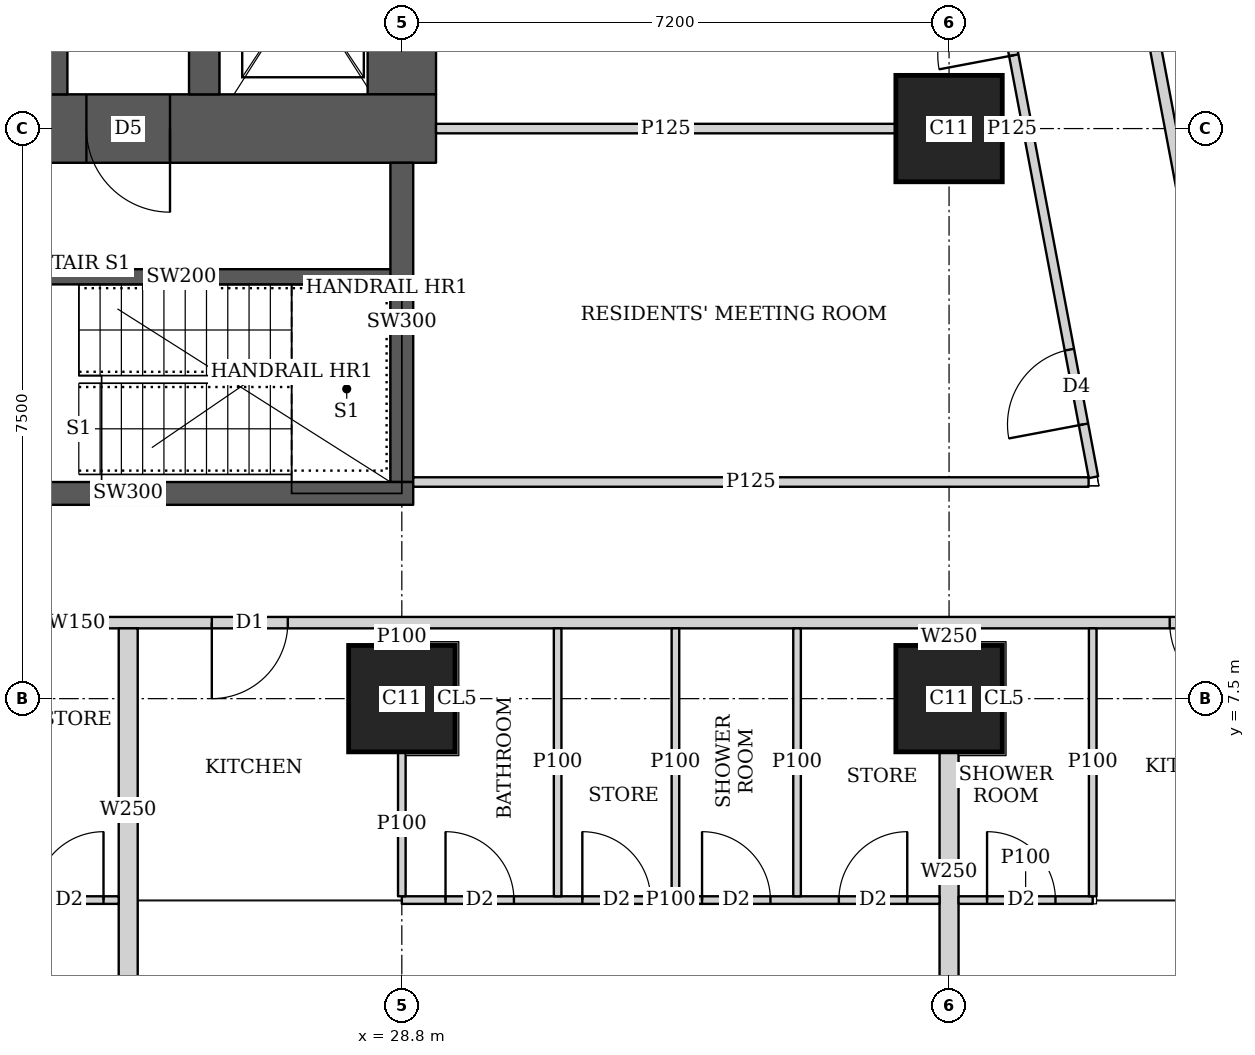
"""IFC4 building model, lengths in metres.
Left out: names, types, materials, properties, quantities, classifications, styles, units other than length and angle.
Written with IfcOpenShell. Run it as: python <this file> out.ifc"""

import sys

from ifc_helpers import new_model, si_unit, direction, frame, frame_2d, origin, origin_2d, place, context, subcontext, project, spatial, rectangle, extrude, element, fill, save


model = new_model("IFC4")
c1 = context("Model", 3, precision=1e-05, world=origin(), true_north=direction((0.0, 1.0)))
c2 = subcontext(c1, "Body", "Model", "MODEL_VIEW")
j1 = project(units=[si_unit("LENGTHUNIT", "METRE"), si_unit("PLANEANGLEUNIT", "RADIAN")], contexts=[c1])
p1 = place(None, origin())
s1 = spatial("IfcSite", under=j1, at=p1, CompositionType="ELEMENT")
p2 = place(p1, origin())
s2 = spatial("IfcBuilding", under=s1, at=p2, CompositionType="ELEMENT")
p3 = place(p2, frame((0.0, 0.0, 204.95)))
s3 = spatial("IfcBuildingStorey", under=s2, at=p3, CompositionType="ELEMENT", Elevation=204.95)
for number, where, z_axis, x_axis in (
    (1, (28.8, 7.5, 0.0), (0.0, 0.0, 1.0), (1.0, 0.0, 0.0)),
    (2, (36.0, 7.5, 0.0), (0.0, 0.0, 1.0), (1.0, 0.0, 0.0)),
    (3, (36.0, 15.0, 0.0), (0.0, 0.0, 1.0), (1.0, 0.0, 0.0)),
):
    element("IfcColumn", number, at=place(p3, frame(where, z_axis=z_axis, x_axis=x_axis)), inside=s3, PredefinedType="COLUMN", context=c2, shape_type="SweptSolid", body=[
        extrude(rectangle(XDim=1.4, YDim=1.4, at=origin_2d()), origin(), (0.0, 0.0, 1.0), 3.75),
    ])
p4 = place(p3, frame((13.95, 15.0, 0.0), z_axis=(0.0, 0.0, 1.0), x_axis=(1.0, 0.0, 0.0)))
e4 = element("IfcWall", 4, at=p4, inside=s3, PredefinedType="SHEAR", context=c2, shape_type="SweptSolid", body=[
    extrude(rectangle(XDim=15.3, YDim=0.9, at=frame_2d((7.65, 0.0))), origin(), (0.0, 0.0, 1.0), 3.75),
])
p5 = place(p4, frame((4.45, 0.0, 0.0)))
e5 = element("IfcOpeningElement", 5, at=p5, cuts=e4, PredefinedType="OPENING", context=c2, shape_type="SweptSolid", body=[
    extrude(rectangle(XDim=1.8, YDim=2.1, at=frame_2d((0.9, 1.05))), frame((0.0, 0.46, 0.0), z_axis=(0.0, -1.0, 0.0), x_axis=(1.0, 0.0, 0.0)), (0.0, 0.0, 1.0), 0.92),
])
p6 = place(p4, frame((10.7, 0.0, 0.0)))
e6 = element("IfcOpeningElement", 6, at=p6, cuts=e4, PredefinedType="OPENING", context=c2, shape_type="SweptSolid", body=[
    extrude(rectangle(XDim=1.1, YDim=2.1, at=frame_2d((0.55, 1.05))), frame((0.0, 0.46, 0.0), z_axis=(0.0, -1.0, 0.0), x_axis=(1.0, 0.0, 0.0)), (0.0, 0.0, 1.0), 0.92),
])
p7 = place(p3, frame((28.8, 15.45, 0.0), z_axis=(0.0, 0.0, 1.0), x_axis=(0.0, 1.0, 0.0)))
e7 = element("IfcWall", 7, at=p7, inside=s3, PredefinedType="SHEAR", context=c2, shape_type="SweptSolid", body=[
    extrude(rectangle(XDim=14.1, YDim=0.9, at=frame_2d((7.05, 0.0))), origin(), (0.0, 0.0, 1.0), 3.75),
])
p8 = place(p3, frame((24.2, 15.45, 0.0), z_axis=(0.0, 0.0, 1.0), x_axis=(0.0, 1.0, 0.0)))
e8 = element("IfcWall", 8, at=p8, inside=s3, PredefinedType="SHEAR", context=c2, shape_type="SweptSolid", body=[
    extrude(rectangle(XDim=14.1, YDim=0.4, at=frame_2d((7.05, 0.0))), origin(), (0.0, 0.0, 1.0), 3.75),
])
p9 = place(p3, frame((26.2, 15.45, 0.0), z_axis=(0.0, 0.0, 1.0), x_axis=(0.0, 1.0, 0.0)))
e9 = element("IfcWall", 9, at=p9, inside=s3, PredefinedType="SHEAR", context=c2, shape_type="SweptSolid", body=[
    extrude(rectangle(XDim=3.1, YDim=0.4, at=frame_2d((1.55, 0.0))), origin(), (0.0, 0.0, 1.0), 3.75),
])
p10 = place(p9, frame((0.825, 0.0, 0.0)))
e10 = element("IfcOpeningElement", 10, at=p10, cuts=e9, PredefinedType="OPENING", context=c2, shape_type="SweptSolid", body=[
    extrude(rectangle(XDim=1.2, YDim=2.1, at=frame_2d((0.6, 1.05))), frame((0.0, 0.21, 0.0), z_axis=(0.0, -1.0, 0.0), x_axis=(1.0, 0.0, 0.0)), (0.0, 0.0, 1.0), 0.42),
])
p11 = place(p3, frame((21.45, 10.2, 0.0), z_axis=(0.0, 0.0, 1.0), x_axis=(1.0, 0.0, 0.0)))
e11 = element("IfcWall", 11, at=p11, inside=s3, PredefinedType="SHEAR", context=c2, shape_type="SweptSolid", body=[
    extrude(rectangle(XDim=7.5, YDim=0.3, at=frame_2d((3.75, 0.0))), origin(), (0.0, 0.0, 1.0), 3.75),
])
p12 = place(p11, frame((0.5, 0.0, 0.0)))
e12 = element("IfcOpeningElement", 12, at=p12, cuts=e11, PredefinedType="OPENING", context=c2, shape_type="SweptSolid", body=[
    extrude(rectangle(XDim=1.1, YDim=2.1, at=frame_2d((0.55, 1.05))), frame((0.0, 0.16, 0.0), z_axis=(0.0, -1.0, 0.0), x_axis=(1.0, 0.0, 0.0)), (0.0, 0.0, 1.0), 0.32),
])
p13 = place(p3, frame((28.8, 10.35, 0.0), z_axis=(0.0, 0.0, 1.0), x_axis=(0.0, 1.0, 0.0)))
e13 = element("IfcWall", 13, at=p13, inside=s3, PredefinedType="SHEAR", context=c2, shape_type="SweptSolid", body=[
    extrude(rectangle(XDim=4.2, YDim=0.3, at=frame_2d((2.1, 0.0))), origin(), (0.0, 0.0, 1.0), 3.75),
])
p14 = place(p3, frame((40.053, 8.5, 0.0), z_axis=(0.0, 0.0, 1.0), x_axis=(-1.0, 0.0, 0.0)))
e14 = element("IfcWall", 14, at=p14, inside=s3, PredefinedType="SOLIDWALL", context=c2, shape_type="SweptSolid", body=[
    extrude(rectangle(XDim=31.052, YDim=0.15, at=frame_2d((15.526, 0.0))), origin(), (0.0, 0.0, 1.0), 3.5),
])
p15 = place(p14, frame((29.178, 0.0, 0.0)))
e15 = element("IfcOpeningElement", 15, at=p15, cuts=e14, PredefinedType="OPENING", context=c2, shape_type="SweptSolid", body=[
    extrude(rectangle(XDim=1.0, YDim=2.1, at=frame_2d((0.5, 1.05))), frame((0.0, 0.085, 0.0), z_axis=(0.0, -1.0, 0.0), x_axis=(1.0, 0.0, 0.0)), (0.0, 0.0, 1.0), 0.17),
])
p16 = place(p14, frame((19.953, 0.0, 0.0)))
e16 = element("IfcOpeningElement", 16, at=p16, cuts=e14, PredefinedType="OPENING", context=c2, shape_type="SweptSolid", body=[
    extrude(rectangle(XDim=1.0, YDim=2.1, at=frame_2d((0.5, 1.05))), frame((0.0, 0.085, 0.0), z_axis=(0.0, -1.0, 0.0), x_axis=(1.0, 0.0, 0.0)), (0.0, 0.0, 1.0), 0.17),
])
p17 = place(p14, frame((12.753, 0.0, 0.0)))
e17 = element("IfcOpeningElement", 17, at=p17, cuts=e14, PredefinedType="OPENING", context=c2, shape_type="SweptSolid", body=[
    extrude(rectangle(XDim=1.0, YDim=2.1, at=frame_2d((0.5, 1.05))), frame((0.0, 0.085, 0.0), z_axis=(0.0, -1.0, 0.0), x_axis=(1.0, 0.0, 0.0)), (0.0, 0.0, 1.0), 0.17),
])
p18 = place(p14, frame((0.15, 0.0, 0.0)))
e18 = element("IfcOpeningElement", 18, at=p18, cuts=e14, PredefinedType="OPENING", context=c2, shape_type="SweptSolid", body=[
    extrude(rectangle(XDim=1.0, YDim=2.1, at=frame_2d((0.5, 1.05))), frame((0.0, 0.085, 0.0), z_axis=(0.0, -1.0, 0.0), x_axis=(1.0, 0.0, 0.0)), (0.0, 0.0, 1.0), 0.17),
])
p19 = place(p3, frame((33.68, 42.723, 0.0), z_axis=(0.0, 0.0, 1.0), x_axis=(0.185601160014, -0.982625162207, 0.0)))
e19 = element("IfcWall", 19, at=p19, inside=s3, PredefinedType="SOLIDWALL", context=c2, shape_type="SweptSolid", body=[
    extrude(rectangle(XDim=41.051, YDim=0.15, at=frame_2d((20.526, 0.0))), origin(), (0.0, 0.0, 1.0), 2.5),
])
p20 = place(p19, frame((12.307, 0.0, 0.0)))
e20 = element("IfcOpeningElement", 20, at=p20, cuts=e19, PredefinedType="OPENING", context=c2, shape_type="SweptSolid", body=[
    extrude(rectangle(XDim=1.0, YDim=2.1, at=frame_2d((0.5, 1.05))), frame((0.0, 0.085, 0.0), z_axis=(0.0, -1.0, 0.0), x_axis=(1.0, 0.0, 0.0)), (0.0, 0.0, 1.0), 0.17),
])
p21 = place(p19, frame((16.123, 0.0, 0.0)))
e21 = element("IfcOpeningElement", 21, at=p21, cuts=e19, PredefinedType="OPENING", context=c2, shape_type="SweptSolid", body=[
    extrude(rectangle(XDim=1.0, YDim=2.1, at=frame_2d((0.5, 1.05))), frame((0.0, 0.085, 0.0), z_axis=(0.0, -1.0, 0.0), x_axis=(1.0, 0.0, 0.0)), (0.0, 0.0, 1.0), 0.17),
])
p22 = place(p19, frame((30.902, 0.0, 0.0)))
e22 = element("IfcOpeningElement", 22, at=p22, cuts=e19, PredefinedType="OPENING", context=c2, shape_type="SweptSolid", body=[
    extrude(rectangle(XDim=1.0, YDim=2.1, at=frame_2d((0.5, 1.05))), frame((0.0, 0.085, 0.0), z_axis=(0.0, -1.0, 0.0), x_axis=(1.0, 0.0, 0.0)), (0.0, 0.0, 1.0), 0.17),
])
p23 = place(p3, frame((25.075, 4.85, 0.0), z_axis=(0.0, 0.0, 1.0), x_axis=(-1.0, 0.0, 0.0)))
e23 = element("IfcWall", 23, at=p23, inside=s3, PredefinedType="PARTITIONING", context=c2, shape_type="SweptSolid", body=[
    extrude(rectangle(XDim=3.475, YDim=0.1, at=frame_2d((1.737, 0.0))), origin(), (0.0, 0.0, 1.0), 3.5),
])
p24 = place(p23, frame((2.0, 0.0, 0.0)))
e24 = element("IfcOpeningElement", 24, at=p24, cuts=e23, PredefinedType="OPENING", context=c2, shape_type="SweptSolid", body=[
    extrude(rectangle(XDim=0.9, YDim=2.1, at=frame_2d((0.45, 1.05))), frame((0.0, 0.06, 0.0), z_axis=(0.0, -1.0, 0.0), x_axis=(1.0, 0.0, 0.0)), (0.0, 0.0, 1.0), 0.12),
])
p25 = place(p23, frame((0.2, 0.0, 0.0)))
e25 = element("IfcOpeningElement", 25, at=p25, cuts=e23, PredefinedType="OPENING", context=c2, shape_type="SweptSolid", body=[
    extrude(rectangle(XDim=0.9, YDim=2.1, at=frame_2d((0.45, 1.05))), frame((0.0, 0.06, 0.0), z_axis=(0.0, -1.0, 0.0), x_axis=(1.0, 0.0, 0.0)), (0.0, 0.0, 1.0), 0.12),
])
p26 = place(p3, frame((35.875, 4.85, 0.0), z_axis=(0.0, 0.0, 1.0), x_axis=(-1.0, 0.0, 0.0)))
e26 = element("IfcWall", 26, at=p26, inside=s3, PredefinedType="PARTITIONING", context=c2, shape_type="SweptSolid", body=[
    extrude(rectangle(XDim=7.075, YDim=0.1, at=frame_2d((3.538, 0.0))), origin(), (0.0, 0.0, 1.0), 3.5),
])
p27 = place(p26, frame((5.6, 0.0, 0.0)))
e27 = element("IfcOpeningElement", 27, at=p27, cuts=e26, PredefinedType="OPENING", context=c2, shape_type="SweptSolid", body=[
    extrude(rectangle(XDim=0.9, YDim=2.1, at=frame_2d((0.45, 1.05))), frame((0.0, 0.06, 0.0), z_axis=(0.0, -1.0, 0.0), x_axis=(1.0, 0.0, 0.0)), (0.0, 0.0, 1.0), 0.12),
])
p28 = place(p26, frame((2.225, 0.0, 0.0)))
e28 = element("IfcOpeningElement", 28, at=p28, cuts=e26, PredefinedType="OPENING", context=c2, shape_type="SweptSolid", body=[
    extrude(rectangle(XDim=0.9, YDim=2.1, at=frame_2d((0.45, 1.05))), frame((0.0, 0.06, 0.0), z_axis=(0.0, -1.0, 0.0), x_axis=(1.0, 0.0, 0.0)), (0.0, 0.0, 1.0), 0.12),
])
p29 = place(p26, frame((3.8, 0.0, 0.0)))
e29 = element("IfcOpeningElement", 29, at=p29, cuts=e26, PredefinedType="OPENING", context=c2, shape_type="SweptSolid", body=[
    extrude(rectangle(XDim=0.9, YDim=2.1, at=frame_2d((0.45, 1.05))), frame((0.0, 0.06, 0.0), z_axis=(0.0, -1.0, 0.0), x_axis=(1.0, 0.0, 0.0)), (0.0, 0.0, 1.0), 0.12),
])
p30 = place(p26, frame((0.425, 0.0, 0.0)))
e30 = element("IfcOpeningElement", 30, at=p30, cuts=e26, PredefinedType="OPENING", context=c2, shape_type="SweptSolid", body=[
    extrude(rectangle(XDim=0.9, YDim=2.1, at=frame_2d((0.45, 1.05))), frame((0.0, 0.06, 0.0), z_axis=(0.0, -1.0, 0.0), x_axis=(1.0, 0.0, 0.0)), (0.0, 0.0, 1.0), 0.12),
])
p31 = place(p3, frame((28.8, 4.9, 0.0), z_axis=(0.0, 0.0, 1.0), x_axis=(0.0, 1.0, 0.0)))
e31 = element("IfcWall", 31, at=p31, inside=s3, PredefinedType="PARTITIONING", context=c2, shape_type="SweptSolid", body=[
    extrude(rectangle(XDim=1.899, YDim=0.1, at=frame_2d((0.95, 0.0))), origin(), (0.0, 0.0, 1.0), 3.5),
])
p32 = place(p3, frame((28.8, 8.201, 0.0), z_axis=(0.0, 0.0, 1.0), x_axis=(0.0, 1.0, 0.0)))
e32 = element("IfcWall", 32, at=p32, inside=s3, PredefinedType="PARTITIONING", context=c2, shape_type="SweptSolid", body=[
    extrude(rectangle(XDim=0.224, YDim=0.1, at=frame_2d((0.112, 0.0))), origin(), (0.0, 0.0, 1.0), 3.5),
])
for number, where, z_axis, x_axis in (
    (33, (32.4, 4.9, 0.0), (0.0, 0.0, 1.0), (0.0, 1.0, 0.0)),
    (34, (30.85, 4.9, 0.0), (0.0, 0.0, 1.0), (0.0, 1.0, 0.0)),
    (35, (34.0, 4.9, 0.0), (0.0, 0.0, 1.0), (0.0, 1.0, 0.0)),
):
    element("IfcWall", number, at=place(p3, frame(where, z_axis=z_axis, x_axis=x_axis)), inside=s3, PredefinedType="PARTITIONING", context=c2, shape_type="SweptSolid", body=[
        extrude(rectangle(XDim=3.525, YDim=0.1, at=frame_2d((1.763, 0.0))), origin(), (0.0, 0.0, 1.0), 3.5),
    ])
p33 = place(p3, frame((25.2, 3.65, 0.0), z_axis=(0.0, 0.0, 1.0), x_axis=(0.0, 1.0, 0.0)))
e36 = element("IfcWall", 36, at=p33, inside=s3, PredefinedType="SOLIDWALL", context=c2, shape_type="SweptSolid", body=[
    extrude(rectangle(XDim=4.775, YDim=0.25, at=frame_2d((2.388, 0.0))), origin(), (0.0, 0.0, 1.0), 3.5),
])
p34 = place(p3, frame((37.89, 4.85, 0.0), z_axis=(0.0, 0.0, 1.0), x_axis=(-1.0, 0.0, 0.0)))
e37 = element("IfcWall", 37, at=p34, inside=s3, PredefinedType="PARTITIONING", context=c2, shape_type="SweptSolid", body=[
    extrude(rectangle(XDim=1.765, YDim=0.1, at=frame_2d((0.882, 0.0))), origin(), (0.0, 0.0, 1.0), 3.5),
])
p35 = place(p34, frame((0.49, 0.0, 0.0)))
e38 = element("IfcOpeningElement", 38, at=p35, cuts=e37, PredefinedType="OPENING", context=c2, shape_type="SweptSolid", body=[
    extrude(rectangle(XDim=0.9, YDim=2.1, at=frame_2d((0.45, 1.05))), frame((0.0, 0.06, 0.0), z_axis=(0.0, -1.0, 0.0), x_axis=(1.0, 0.0, 0.0)), (0.0, 0.0, 1.0), 0.12),
])
p36 = place(p3, frame((37.89, 4.9, 0.0), z_axis=(0.0, 0.0, 1.0), x_axis=(0.0, 1.0, 0.0)))
e39 = element("IfcWall", 39, at=p36, inside=s3, PredefinedType="PARTITIONING", context=c2, shape_type="SweptSolid", body=[
    extrude(rectangle(XDim=3.525, YDim=0.1, at=frame_2d((1.763, 0.0))), origin(), (0.0, 0.0, 1.0), 3.5),
])
p37 = place(p3, frame((36.0, 3.65, 0.0), z_axis=(0.0, 0.0, 1.0), x_axis=(0.0, 1.0, 0.0)))
e40 = element("IfcWall", 40, at=p37, inside=s3, PredefinedType="SOLIDWALL", context=c2, shape_type="SweptSolid", body=[
    extrude(rectangle(XDim=3.149, YDim=0.25, at=frame_2d((1.575, 0.0))), origin(), (0.0, 0.0, 1.0), 3.5),
])
p38 = place(p3, frame((36.0, 8.201, 0.0), z_axis=(0.0, 0.0, 1.0), x_axis=(0.0, 1.0, 0.0)))
e41 = element("IfcWall", 41, at=p38, inside=s3, PredefinedType="SOLIDWALL", context=c2, shape_type="SweptSolid", body=[
    extrude(rectangle(XDim=0.224, YDim=0.25, at=frame_2d((0.112, 0.0))), origin(), (0.0, 0.0, 1.0), 3.5),
])
p39 = place(p3, frame((28.95, 10.35, 0.0), z_axis=(0.0, 0.0, 1.0), x_axis=(1.0, 0.0, 0.0)))
e42 = element("IfcWall", 42, at=p39, inside=s3, PredefinedType="PARTITIONING", context=c2, shape_type="SweptSolid", body=[
    extrude(rectangle(XDim=8.886, YDim=0.125, at=frame_2d((4.443, 0.0))), origin(), (0.0, 0.0, 1.0), 3.5),
])
p40 = place(p3, frame((37.9, 10.413, 0.0), z_axis=(0.0, 0.0, 1.0), x_axis=(-0.185589740669, 0.982627319058, 0.0)))
e43 = element("IfcWall", 43, at=p40, inside=s3, PredefinedType="PARTITIONING", context=c2, shape_type="SweptSolid", body=[
    extrude(rectangle(XDim=24.602, YDim=0.125, at=frame_2d((12.301, 0.0))), origin(), (0.0, 0.0, 1.0), 2.5),
])
p41 = place(p40, frame((0.708, 0.0, 0.0)))
e44 = element("IfcOpeningElement", 44, at=p41, cuts=e43, PredefinedType="OPENING", context=c2, shape_type="SweptSolid", body=[
    extrude(rectangle(XDim=1.0, YDim=2.1, at=frame_2d((0.5, 1.05))), frame((0.0, 0.073, 0.0), z_axis=(0.0, -1.0, 0.0), x_axis=(1.0, 0.0, 0.0)), (0.0, 0.0, 1.0), 0.145),
])
p42 = place(p40, frame((5.65, 0.0, 0.0)))
e45 = element("IfcOpeningElement", 45, at=p42, cuts=e43, PredefinedType="OPENING", context=c2, shape_type="SweptSolid", body=[
    extrude(rectangle(XDim=1.0, YDim=2.1, at=frame_2d((0.5, 1.05))), frame((0.0, 0.073, 0.0), z_axis=(0.0, -1.0, 0.0), x_axis=(1.0, 0.0, 0.0)), (0.0, 0.0, 1.0), 0.145),
])
p43 = place(p40, frame((13.124, 0.0, 0.0)))
e46 = element("IfcOpeningElement", 46, at=p43, cuts=e43, PredefinedType="OPENING", context=c2, shape_type="SweptSolid", body=[
    extrude(rectangle(XDim=1.0, YDim=2.1, at=frame_2d((0.5, 1.05))), frame((0.0, 0.073, 0.0), z_axis=(0.0, -1.0, 0.0), x_axis=(1.0, 0.0, 0.0)), (0.0, 0.0, 1.0), 0.145),
])
p44 = place(p40, frame((16.94, 0.0, 0.0)))
e47 = element("IfcOpeningElement", 47, at=p44, cuts=e43, PredefinedType="OPENING", context=c2, shape_type="SweptSolid", body=[
    extrude(rectangle(XDim=1.0, YDim=2.1, at=frame_2d((0.5, 1.05))), frame((0.0, 0.073, 0.0), z_axis=(0.0, -1.0, 0.0), x_axis=(1.0, 0.0, 0.0)), (0.0, 0.0, 1.0), 0.145),
])
p45 = place(p40, frame((20.9, 0.0, 0.0)))
e48 = element("IfcOpeningElement", 48, at=p45, cuts=e43, PredefinedType="OPENING", context=c2, shape_type="SweptSolid", body=[
    extrude(rectangle(XDim=1.0, YDim=2.1, at=frame_2d((0.5, 1.05))), frame((0.0, 0.073, 0.0), z_axis=(0.0, -1.0, 0.0), x_axis=(1.0, 0.0, 0.0)), (0.0, 0.0, 1.0), 0.145),
])
p46 = place(p3, frame((29.25, 15.0, 0.0), z_axis=(0.0, 0.0, 1.0), x_axis=(1.0, 0.0, 0.0)))
e49 = element("IfcWall", 49, at=p46, inside=s3, PredefinedType="PARTITIONING", context=c2, shape_type="SweptSolid", body=[
    extrude(rectangle(XDim=6.049, YDim=0.125, at=frame_2d((3.024, 0.0))), origin(), (0.0, 0.0, 1.0), 3.5),
])
p47 = place(p3, frame((36.701, 15.0, 0.0), z_axis=(0.0, 0.0, 1.0), x_axis=(1.0, 0.0, 0.0)))
e50 = element("IfcWall", 50, at=p47, inside=s3, PredefinedType="PARTITIONING", context=c2, shape_type="SweptSolid", body=[
    extrude(rectangle(XDim=0.257, YDim=0.125, at=frame_2d((0.128, 0.0))), origin(), (0.0, 0.0, 1.0), 3.5),
])
p48 = place(p3, frame((23.0, 13.05, 0.0), z_axis=(0.0, 0.0, 1.0), x_axis=(1.0, 0.0, 0.0)))
e51 = element("IfcWall", 51, at=p48, inside=s3, PredefinedType="SHEAR", context=c2, shape_type="SweptSolid", body=[
    extrude(rectangle(XDim=5.8, YDim=0.2, at=frame_2d((2.9, 0.0))), origin(), (0.0, 0.0, 1.0), 3.75),
])
p49 = place(p25, origin())
e52 = element("IfcDoor", 52, at=p49, inside=s3, OperationType="SINGLE_SWING_RIGHT", PredefinedType="DOOR", context=c2, shape_type="SweptSolid", body=[
    extrude(rectangle(XDim=0.9, YDim=2.1, at=frame_2d((0.45, 1.05))), frame((0.0, 0.025, 0.0), z_axis=(0.0, -1.0, 0.0), x_axis=(1.0, 0.0, 0.0)), (0.0, 0.0, 1.0), 0.05),
])
fill(e25, e52)
p50 = place(p27, origin())
e53 = element("IfcDoor", 53, at=p50, inside=s3, OperationType="SINGLE_SWING_LEFT", PredefinedType="DOOR", context=c2, shape_type="SweptSolid", body=[
    extrude(rectangle(XDim=0.9, YDim=2.1, at=frame_2d((0.45, 1.05))), frame((0.0, 0.025, 0.0), z_axis=(0.0, -1.0, 0.0), x_axis=(1.0, 0.0, 0.0)), (0.0, 0.0, 1.0), 0.05),
])
fill(e27, e53)
p51 = place(p28, origin())
e54 = element("IfcDoor", 54, at=p51, inside=s3, OperationType="SINGLE_SWING_LEFT", PredefinedType="DOOR", context=c2, shape_type="SweptSolid", body=[
    extrude(rectangle(XDim=0.9, YDim=2.1, at=frame_2d((0.45, 1.05))), frame((0.0, 0.025, 0.0), z_axis=(0.0, -1.0, 0.0), x_axis=(1.0, 0.0, 0.0)), (0.0, 0.0, 1.0), 0.05),
])
fill(e28, e54)
p52 = place(p29, origin())
e55 = element("IfcDoor", 55, at=p52, inside=s3, OperationType="SINGLE_SWING_LEFT", PredefinedType="DOOR", context=c2, shape_type="SweptSolid", body=[
    extrude(rectangle(XDim=0.9, YDim=2.1, at=frame_2d((0.45, 1.05))), frame((0.0, 0.025, 0.0), z_axis=(0.0, -1.0, 0.0), x_axis=(1.0, 0.0, 0.0)), (0.0, 0.0, 1.0), 0.05),
])
fill(e29, e55)
p53 = place(p30, origin())
e56 = element("IfcDoor", 56, at=p53, inside=s3, OperationType="SINGLE_SWING_RIGHT", PredefinedType="DOOR", context=c2, shape_type="SweptSolid", body=[
    extrude(rectangle(XDim=0.9, YDim=2.1, at=frame_2d((0.45, 1.05))), frame((0.0, 0.025, 0.0), z_axis=(0.0, -1.0, 0.0), x_axis=(1.0, 0.0, 0.0)), (0.0, 0.0, 1.0), 0.05),
])
fill(e30, e56)
p54 = place(p17, origin())
e57 = element("IfcDoor", 57, at=p54, inside=s3, OperationType="SINGLE_SWING_RIGHT", PredefinedType="DOOR", context=c2, shape_type="SweptSolid", body=[
    extrude(rectangle(XDim=1.0, YDim=2.1, at=frame_2d((0.5, 1.05))), frame((0.0, 0.025, 0.0), z_axis=(0.0, -1.0, 0.0), x_axis=(1.0, 0.0, 0.0)), (0.0, 0.0, 1.0), 0.05),
])
fill(e17, e57)
p55 = place(p35, origin())
e58 = element("IfcDoor", 58, at=p55, inside=s3, OperationType="SINGLE_SWING_LEFT", PredefinedType="DOOR", context=c2, shape_type="SweptSolid", body=[
    extrude(rectangle(XDim=0.9, YDim=2.1, at=frame_2d((0.45, 1.05))), frame((0.0, 0.025, 0.0), z_axis=(0.0, -1.0, 0.0), x_axis=(1.0, 0.0, 0.0)), (0.0, 0.0, 1.0), 0.05),
])
fill(e38, e58)
p56 = place(p18, origin())
e59 = element("IfcDoor", 59, at=p56, inside=s3, OperationType="SINGLE_SWING_LEFT", PredefinedType="DOOR", context=c2, shape_type="SweptSolid", body=[
    extrude(rectangle(XDim=1.0, YDim=2.1, at=frame_2d((0.5, 1.05))), frame((0.0, 0.025, 0.0), z_axis=(0.0, -1.0, 0.0), x_axis=(1.0, 0.0, 0.0)), (0.0, 0.0, 1.0), 0.05),
])
fill(e18, e59)
p57 = place(p41, origin())
e60 = element("IfcDoor", 60, at=p57, inside=s3, OperationType="SINGLE_SWING_LEFT", PredefinedType="DOOR", context=c2, shape_type="SweptSolid", body=[
    extrude(rectangle(XDim=1.0, YDim=2.1, at=frame_2d((0.5, 1.05))), frame((0.0, 0.025, 0.0), z_axis=(0.0, -1.0, 0.0), x_axis=(1.0, 0.0, 0.0)), (0.0, 0.0, 1.0), 0.05),
])
fill(e44, e60)
p58 = place(p42, origin())
e61 = element("IfcDoor", 61, at=p58, inside=s3, OperationType="SINGLE_SWING_LEFT", PredefinedType="DOOR", context=c2, shape_type="SweptSolid", body=[
    extrude(rectangle(XDim=1.0, YDim=2.1, at=frame_2d((0.5, 1.05))), frame((0.0, 0.025, 0.0), z_axis=(0.0, -1.0, 0.0), x_axis=(1.0, 0.0, 0.0)), (0.0, 0.0, 1.0), 0.05),
])
fill(e45, e61)
p59 = place(p6, origin())
e62 = element("IfcDoor", 62, at=p59, inside=s3, OperationType="SINGLE_SWING_LEFT", PredefinedType="DOOR", context=c2, shape_type="SweptSolid", body=[
    extrude(rectangle(XDim=1.1, YDim=2.1, at=frame_2d((0.55, 1.05))), frame((0.0, 0.025, 0.0), z_axis=(0.0, -1.0, 0.0), x_axis=(1.0, 0.0, 0.0)), (0.0, 0.0, 1.0), 0.05),
])
fill(e6, e62)
save(model, sys.argv[1])
